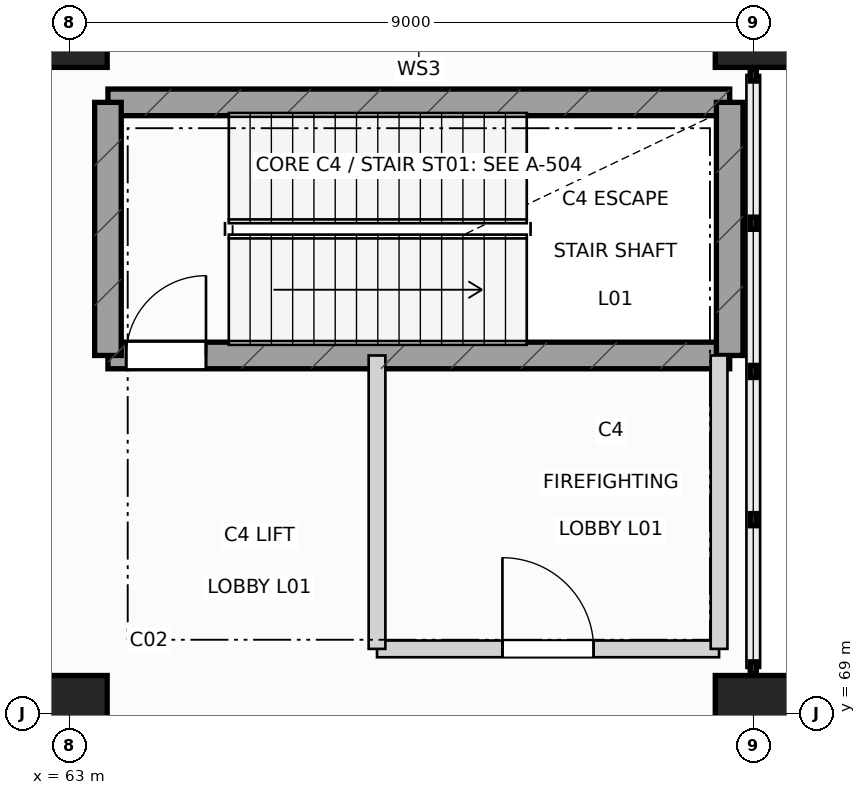
"""IFC4 building model, lengths in metres.
Left out: names, types, materials, properties, quantities, classifications, styles, units other than length and angle.
Written with IfcOpenShell. Run it as: python <this file> out.ifc"""

import sys

from ifc_helpers import new_model, si_unit, direction, frame, frame_2d, origin, origin_2d, place, context, subcontext, project, spatial, rectangle, extrude, element, fill, save


model = new_model("IFC4")
c1 = context("Model", 3, precision=1e-05, world=origin(), true_north=direction((0.0, 1.0)))
c2 = subcontext(c1, "Body", "Model", "MODEL_VIEW")
j1 = project(units=[si_unit("LENGTHUNIT", "METRE"), si_unit("PLANEANGLEUNIT", "RADIAN")], contexts=[c1])
p1 = place(None, origin())
s1 = spatial("IfcSite", under=j1, at=p1, CompositionType="ELEMENT")
p2 = place(p1, origin())
s2 = spatial("IfcBuilding", under=s1, at=p2, CompositionType="ELEMENT")
p3 = place(p2, frame((0.0, 0.0, 6.0)))
s3 = spatial("IfcBuildingStorey", under=s2, at=p3, CompositionType="ELEMENT", Elevation=6.0)
for number, where, z_axis, x_axis in (
    (1, (63.0, 69.0, 0.0), (0.0, 0.0, 1.0), (1.0, 0.0, 0.0)),
    (2, (63.0, 78.0, 0.0), (0.0, 0.0, 1.0), (1.0, 0.0, 0.0)),
    (3, (72.0, 69.0, 0.0), (0.0, 0.0, 1.0), (1.0, 0.0, 0.0)),
    (4, (72.0, 78.0, 0.0), (0.0, 0.0, 1.0), (1.0, 0.0, 0.0)),
):
    element("IfcColumn", number, at=place(p3, frame(where, z_axis=z_axis, x_axis=x_axis)), inside=s3, PredefinedType="COLUMN", context=c2, shape_type="SweptSolid", body=[
        extrude(rectangle(XDim=1.0, YDim=1.0, at=origin_2d()), origin(), (0.0, 0.0, 1.0), 5.4),
    ])
p4 = place(p3, frame((63.51, 73.71, 0.0), z_axis=(0.0, 0.0, 1.0), x_axis=(1.0, 0.0, 0.0)))
e5 = element("IfcWall", 5, at=p4, inside=s3, PredefinedType="SHEAR", context=c2, shape_type="SweptSolid", body=[
    extrude(rectangle(XDim=8.18, YDim=0.35, at=frame_2d((4.09, 0.0))), origin(), (0.0, 0.0, 1.0), 5.05),
])
p5 = place(p4, frame((0.24, 0.0, 0.0)))
e6 = element("IfcOpeningElement", 6, at=p5, cuts=e5, PredefinedType="OPENING", context=c2, shape_type="SweptSolid", body=[
    extrude(rectangle(XDim=1.05, YDim=2.18, at=frame_2d((0.525, 1.09))), frame((0.0, 0.185, 0.0), z_axis=(0.0, -1.0, 0.0), x_axis=(1.0, 0.0, 0.0)), (0.0, 0.0, 1.0), 0.37),
])
p6 = place(p3, frame((63.51, 77.04, 0.0), z_axis=(0.0, 0.0, 1.0), x_axis=(1.0, 0.0, 0.0)))
e7 = element("IfcWall", 7, at=p6, inside=s3, PredefinedType="SHEAR", context=c2, shape_type="SweptSolid", body=[
    extrude(rectangle(XDim=8.18, YDim=0.35, at=frame_2d((4.09, 0.0))), origin(), (0.0, 0.0, 1.0), 5.05),
])
for number, where, z_axis, x_axis in (
    (8, (63.51, 73.71, 0.0), (0.0, 0.0, 1.0), (0.0, 1.0, 0.0)),
    (9, (71.69, 73.71, 0.0), (0.0, 0.0, 1.0), (0.0, 1.0, 0.0)),
):
    element("IfcWall", number, at=place(p3, frame(where, z_axis=z_axis, x_axis=x_axis)), inside=s3, PredefinedType="SHEAR", context=c2, shape_type="SweptSolid", body=[
        extrude(rectangle(XDim=3.33, YDim=0.35, at=frame_2d((1.665, 0.0))), origin(), (0.0, 0.0, 1.0), 5.05),
    ])
p7 = place(p3, frame((67.05, 69.85, 0.0), z_axis=(0.0, 0.0, 1.0), x_axis=(1.0, 0.0, 0.0)))
e10 = element("IfcWall", 10, at=p7, inside=s3, PredefinedType="PARTITIONING", context=c2, shape_type="SweptSolid", body=[
    extrude(rectangle(XDim=4.5, YDim=0.22, at=frame_2d((2.25, 0.0))), origin(), (0.0, 0.0, 1.0), 4.215),
])
p8 = place(p7, frame((1.65, 0.0, 0.0)))
e11 = element("IfcOpeningElement", 11, at=p8, cuts=e10, PredefinedType="OPENING", context=c2, shape_type="SweptSolid", body=[
    extrude(rectangle(XDim=1.2, YDim=2.18, at=frame_2d((0.6, 1.09))), frame((0.0, 0.12, 0.0), z_axis=(0.0, -1.0, 0.0), x_axis=(1.0, 0.0, 0.0)), (0.0, 0.0, 1.0), 0.24),
])
p9 = place(p3, frame((67.05, 69.85, 0.0), z_axis=(0.0, 0.0, 1.0), x_axis=(0.0, 1.0, 0.0)))
e12 = element("IfcWall", 12, at=p9, inside=s3, PredefinedType="PARTITIONING", context=c2, shape_type="SweptSolid", body=[
    extrude(rectangle(XDim=3.86, YDim=0.22, at=frame_2d((1.93, 0.0))), origin(), (0.0, 0.0, 1.0), 4.645),
])
p10 = place(p3, frame((71.55, 69.85, 0.0), z_axis=(0.0, 0.0, 1.0), x_axis=(0.0, 1.0, 0.0)))
e13 = element("IfcWall", 13, at=p10, inside=s3, PredefinedType="PARTITIONING", context=c2, shape_type="SweptSolid", body=[
    extrude(rectangle(XDim=3.86, YDim=0.22, at=frame_2d((1.93, 0.0))), origin(), (0.0, 0.0, 1.0), 4.215),
])
p11 = place(p5, origin())
e14 = element("IfcDoor", 14, at=p11, inside=s3, OperationType="SINGLE_SWING_RIGHT", PredefinedType="DOOR", context=c2, shape_type="SweptSolid", body=[
    extrude(rectangle(XDim=1.05, YDim=2.18, at=frame_2d((0.525, 1.09))), frame((0.0, 0.025, 0.0), z_axis=(0.0, -1.0, 0.0), x_axis=(1.0, 0.0, 0.0)), (0.0, 0.0, 1.0), 0.05),
])
fill(e6, e14)
p12 = place(p8, origin())
e15 = element("IfcDoor", 15, at=p12, inside=s3, OperationType="SINGLE_SWING_LEFT", PredefinedType="DOOR", context=c2, shape_type="SweptSolid", body=[
    extrude(rectangle(XDim=1.2, YDim=2.18, at=frame_2d((0.6, 1.09))), frame((0.0, 0.025, 0.0), z_axis=(0.0, -1.0, 0.0), x_axis=(1.0, 0.0, 0.0)), (0.0, 0.0, 1.0), 0.05),
])
fill(e11, e15)
save(model, sys.argv[1])
